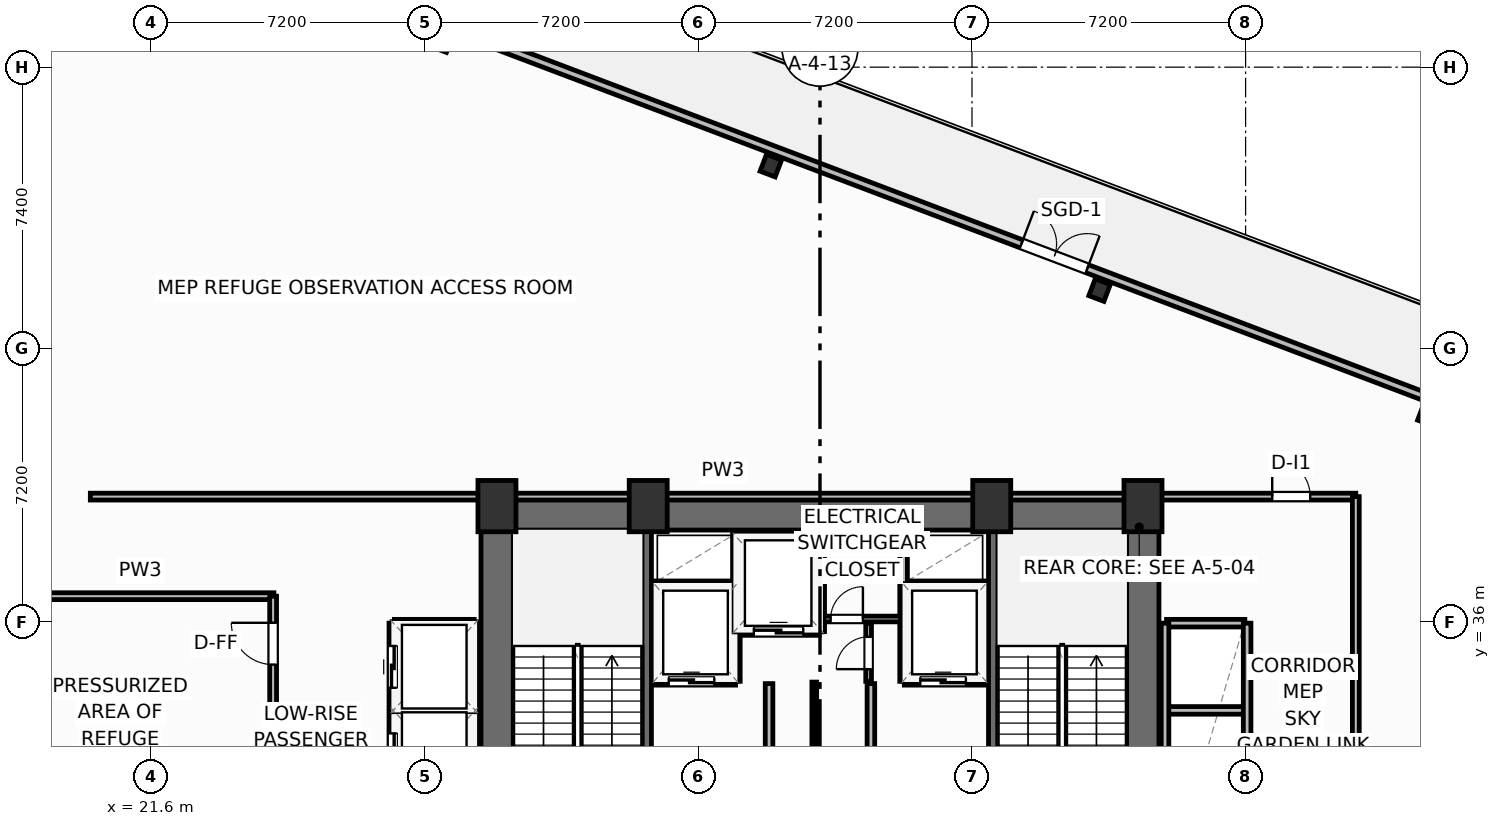
"""IFC4 building model, lengths in metres.
Left out: names, types, materials, properties, quantities, classifications, styles, units other than length and angle.
Written with IfcOpenShell. Run it as: python <this file> out.ifc"""

import sys

from ifc_helpers import new_model, si_unit, direction, frame, frame_2d, origin, origin_2d, place, context, subcontext, project, spatial, rectangle, i_section, extrude, element, fill, save


model = new_model("IFC4")
c1 = context("Model", 3, precision=1e-05, world=origin(), true_north=direction((0.0, 1.0)))
c2 = subcontext(c1, "Body", "Model", "MODEL_VIEW")
j1 = project(units=[si_unit("LENGTHUNIT", "METRE"), si_unit("PLANEANGLEUNIT", "RADIAN")], contexts=[c1])
p1 = place(None, origin())
s1 = spatial("IfcSite", under=j1, at=p1, CompositionType="ELEMENT")
p2 = place(p1, origin())
s2 = spatial("IfcBuilding", under=s1, at=p2, CompositionType="ELEMENT")
p3 = place(p2, frame((0.0, 0.0, 71.4)))
s3 = spatial("IfcBuildingStorey", under=s2, at=p3, CompositionType="ELEMENT", Elevation=71.4)
for number, where, z_axis, x_axis in (
    (1, (30.7, 39.05, 0.0), (0.0, 0.0, 1.0), (1.0, 0.0, 0.0)),
    (2, (34.68, 39.05, 0.0), (0.0, 0.0, 1.0), (1.0, 0.0, 0.0)),
    (3, (43.72, 39.05, 0.0), (0.0, 0.0, 1.0), (1.0, 0.0, 0.0)),
    (4, (47.7, 39.05, 0.0), (0.0, 0.0, 1.0), (1.0, 0.0, 0.0)),
):
    element("IfcColumn", number, at=place(p3, frame(where, z_axis=z_axis, x_axis=x_axis)), inside=s3, PredefinedType="COLUMN", context=c2, shape_type="SweptSolid", body=[
        extrude(rectangle(XDim=1.0, YDim=1.35, at=origin_2d()), origin(), (0.0, 0.0, 1.0), 4.8),
    ])
p4 = place(p3, frame((30.28, 38.845, 0.0), z_axis=(0.0, 0.0, 1.0), x_axis=(1.0, 0.0, 0.0)))
e5 = element("IfcWall", 5, at=p4, inside=s3, PredefinedType="SHEAR", context=c2, shape_type="SweptSolid", body=[
    extrude(rectangle(XDim=17.84, YDim=0.85, at=frame_2d((8.92, 0.0))), origin(), (0.0, 0.0, 1.0), 4.55),
])
for number, where, z_axis, x_axis in (
    (6, (30.705, 29.2, 0.0), (0.0, 0.0, 1.0), (0.0, 1.0, 0.0)),
    (7, (47.695, 29.2, 0.0), (0.0, 0.0, 1.0), (0.0, 1.0, 0.0)),
):
    element("IfcWall", number, at=place(p3, frame(where, z_axis=z_axis, x_axis=x_axis)), inside=s3, PredefinedType="SHEAR", context=c2, shape_type="SweptSolid", body=[
        extrude(rectangle(XDim=9.22, YDim=0.85, at=frame_2d((4.61, 0.0))), origin(), (0.0, 0.0, 1.0), 4.55),
    ])
p5 = place(p3, frame((34.64, 29.2, 0.0), z_axis=(0.0, 0.0, 1.0), x_axis=(0.0, 1.0, 0.0)))
e8 = element("IfcWall", 8, at=p5, inside=s3, PredefinedType="SHEAR", context=c2, shape_type="SweptSolid", body=[
    extrude(rectangle(XDim=9.22, YDim=0.25, at=frame_2d((4.61, 0.0))), origin(), (0.0, 0.0, 1.0), 4.55),
])
p6 = place(p5, frame((0.65, 0.0, 0.0)))
e9 = element("IfcOpeningElement", 9, at=p6, cuts=e8, PredefinedType="OPENING", context=c2, shape_type="SweptSolid", body=[
    extrude(rectangle(XDim=1.05, YDim=2.15, at=frame_2d((0.525, 1.075))), frame((0.0, 0.135, 0.0), z_axis=(0.0, -1.0, 0.0), x_axis=(1.0, 0.0, 0.0)), (0.0, 0.0, 1.0), 0.27),
])
p7 = place(p3, frame((43.76, 29.2, 0.0), z_axis=(0.0, 0.0, 1.0), x_axis=(0.0, 1.0, 0.0)))
e10 = element("IfcWall", 10, at=p7, inside=s3, PredefinedType="SHEAR", context=c2, shape_type="SweptSolid", body=[
    extrude(rectangle(XDim=9.22, YDim=0.25, at=frame_2d((4.61, 0.0))), origin(), (0.0, 0.0, 1.0), 4.55),
])
p8 = place(p7, frame((0.65, 0.0, 0.0)))
e11 = element("IfcOpeningElement", 11, at=p8, cuts=e10, PredefinedType="OPENING", context=c2, shape_type="SweptSolid", body=[
    extrude(rectangle(XDim=1.05, YDim=2.15, at=frame_2d((0.525, 1.075))), frame((0.0, 0.135, 0.0), z_axis=(0.0, -1.0, 0.0), x_axis=(1.0, 0.0, 0.0)), (0.0, 0.0, 1.0), 0.27),
])
for number, where, z_axis, x_axis in (
    (12, (55.208, 41.459, -0.32), (0.0, 0.0, 1.0), (0.935, -0.354, 0.0)),
    (13, (46.557, 44.734, -0.32), (0.0, 0.0, 1.0), (0.935, -0.354, 0.0)),
    (14, (37.906, 48.009, -0.32), (0.0, 0.0, 1.0), (0.935, -0.354, 0.0)),
    (15, (29.256, 51.284, -0.32), (0.0, 0.0, 1.0), (0.935, -0.354, 0.0)),
):
    element("IfcColumn", number, at=place(p3, frame(where, z_axis=z_axis, x_axis=x_axis)), inside=s3, PredefinedType="COLUMN", context=c2, shape_type="SweptSolid", body=[
        extrude(i_section(OverallWidth=0.424, OverallDepth=0.474, WebThickness=0.048, FlangeThickness=0.077, FilletRadius=0.025, at=origin_2d()), origin(), (0.0, 0.0, 1.0), 5.12),
    ])
p9 = place(p3, frame((18.646, 55.739, 0.0), z_axis=(0.0, 0.0, 1.0), x_axis=(0.935222250741, -0.354061211825, 0.0)))
e16 = element("IfcWall", 16, at=p9, inside=s3, PredefinedType="SOLIDWALL", context=c2, shape_type="SweptSolid", body=[
    extrude(rectangle(XDim=60.0, YDim=0.22, at=frame_2d((30.0, 0.0))), origin(), (0.0, 0.0, 1.0), 3.83),
])
p10 = place(p9, frame((27.647, 0.0, 0.0)))
e17 = element("IfcOpeningElement", 17, at=p10, cuts=e16, PredefinedType="OPENING", context=c2, shape_type="SweptSolid", body=[
    extrude(rectangle(XDim=1.85, YDim=2.3, at=frame_2d((0.925, 1.15))), frame((0.0, 0.12, 0.0), z_axis=(0.0, -1.0, 0.0), x_axis=(1.0, 0.0, 0.0)), (0.0, 0.0, 1.0), 0.24),
])
p11 = place(p9, frame((0.55, 0.0, 0.75)))
e18 = element("IfcOpeningElement", 18, at=p11, cuts=e16, PredefinedType="OPENING", context=c2, shape_type="SweptSolid", body=[
    extrude(rectangle(XDim=1.65, YDim=1.65, at=frame_2d((0.825, 0.825))), frame((0.0, 0.12, 0.0), z_axis=(0.0, -1.0, 0.0), x_axis=(1.0, 0.0, 0.0)), (0.0, 0.0, 1.0), 0.24),
])
p12 = place(p9, frame((57.8, 0.0, 0.75)))
e19 = element("IfcOpeningElement", 19, at=p12, cuts=e16, PredefinedType="OPENING", context=c2, shape_type="SweptSolid", body=[
    extrude(rectangle(XDim=1.65, YDim=1.65, at=frame_2d((0.825, 0.825))), frame((0.0, 0.12, 0.0), z_axis=(0.0, -1.0, 0.0), x_axis=(1.0, 0.0, 0.0)), (0.0, 0.0, 1.0), 0.24),
])
p13 = place(p3, frame((17.8, 36.68, 0.0), z_axis=(0.0, 0.0, 1.0), x_axis=(1.0, 0.0, 0.0)))
e20 = element("IfcWall", 20, at=p13, inside=s3, PredefinedType="PARTITIONING", context=c2, shape_type="SweptSolid", body=[
    extrude(rectangle(XDim=7.03, YDim=0.18, at=frame_2d((3.515, 0.0))), origin(), (0.0, 0.0, 1.0), 4.55),
])
p14 = place(p3, frame((24.81, 29.08, 0.0), z_axis=(0.0, 0.0, 1.0), x_axis=(0.0, 1.0, 0.0)))
e21 = element("IfcWall", 21, at=p14, inside=s3, PredefinedType="PARTITIONING", context=c2, shape_type="SweptSolid", body=[
    extrude(rectangle(XDim=7.6, YDim=0.18, at=frame_2d((3.8, 0.0))), origin(), (0.0, 0.0, 1.0), 4.55),
])
p15 = place(p14, frame((5.8, 0.0, 0.0)))
e22 = element("IfcOpeningElement", 22, at=p15, cuts=e21, PredefinedType="OPENING", context=c2, shape_type="SweptSolid", body=[
    extrude(rectangle(XDim=1.1, YDim=2.15, at=frame_2d((0.55, 1.075))), frame((0.0, 0.1, 0.0), z_axis=(0.0, -1.0, 0.0), x_axis=(1.0, 0.0, 0.0)), (0.0, 0.0, 1.0), 0.2),
])
p16 = place(p3, frame((20.0, 39.3, 0.0), z_axis=(0.0, 0.0, 1.0), x_axis=(1.0, 0.0, 0.0)))
e23 = element("IfcWall", 23, at=p16, inside=s3, PredefinedType="PARTITIONING", context=c2, shape_type="SweptSolid", body=[
    extrude(rectangle(XDim=33.3, YDim=0.18, at=frame_2d((16.65, 0.0))), origin(), (0.0, 0.0, 1.0), 3.68),
])
p17 = place(p16, frame((31.1, 0.0, 0.0)))
e24 = element("IfcOpeningElement", 24, at=p17, cuts=e23, PredefinedType="OPENING", context=c2, shape_type="SweptSolid", body=[
    extrude(rectangle(XDim=1.0, YDim=2.05, at=frame_2d((0.5, 1.025))), frame((0.0, 0.1, 0.0), z_axis=(0.0, -1.0, 0.0), x_axis=(1.0, 0.0, 0.0)), (0.0, 0.0, 1.0), 0.2),
])
p18 = place(p3, frame((53.3, 29.02, 0.0), z_axis=(0.0, 0.0, 1.0), x_axis=(0.0, 1.0, 0.0)))
e25 = element("IfcWall", 25, at=p18, inside=s3, PredefinedType="PARTITIONING", context=c2, shape_type="SweptSolid", body=[
    extrude(rectangle(XDim=10.28, YDim=0.18, at=frame_2d((5.14, 0.0))), origin(), (0.0, 0.0, 1.0), 4.55),
])
for number, where, z_axis, x_axis in (
    (26, (37.86, 29.2, 0.0), (0.0, 0.0, 1.0), (0.0, 1.0, 0.0)),
    (27, (40.54, 29.2, 0.0), (0.0, 0.0, 1.0), (0.0, 1.0, 0.0)),
):
    element("IfcWall", number, at=place(p3, frame(where, z_axis=z_axis, x_axis=x_axis)), inside=s3, PredefinedType="PARTITIONING", context=c2, shape_type="SweptSolid", body=[
        extrude(rectangle(XDim=5.18, YDim=0.2, at=frame_2d((2.59, 0.0))), origin(), (0.0, 0.0, 1.0), 4.55),
    ])
p19 = place(p3, frame((34.8, 34.44, 0.0), z_axis=(0.0, 0.0, 1.0), x_axis=(1.0, 0.0, 0.0)))
e28 = element("IfcWall", 28, at=p19, inside=s3, PredefinedType="PARTITIONING", context=c2, shape_type="SweptSolid", body=[
    extrude(rectangle(XDim=2.18, YDim=0.2, at=frame_2d((1.09, 0.0))), origin(), (0.0, 0.0, 1.0), 4.55),
])
p20 = place(p19, frame((0.42, 0.0, 0.0)))
e29 = element("IfcOpeningElement", 29, at=p20, cuts=e28, PredefinedType="OPENING", context=c2, shape_type="SweptSolid", body=[
    extrude(rectangle(XDim=1.2, YDim=2.2, at=frame_2d((0.6, 1.1))), frame((0.0, 0.11, 0.0), z_axis=(0.0, -1.0, 0.0), x_axis=(1.0, 0.0, 0.0)), (0.0, 0.0, 1.0), 0.22),
])
p21 = place(p3, frame((34.8, 36.98, 0.0), z_axis=(0.0, 0.0, 1.0), x_axis=(1.0, 0.0, 0.0)))
e30 = element("IfcWall", 30, at=p21, inside=s3, PredefinedType="PARTITIONING", context=c2, shape_type="SweptSolid", body=[
    extrude(rectangle(XDim=2.18, YDim=0.2, at=frame_2d((1.09, 0.0))), origin(), (0.0, 0.0, 1.0), 4.55),
])
p22 = place(p3, frame((37.0, 34.44, 0.0), z_axis=(0.0, 0.0, 1.0), x_axis=(0.0, 1.0, 0.0)))
e31 = element("IfcWall", 31, at=p22, inside=s3, PredefinedType="PARTITIONING", context=c2, shape_type="SweptSolid", body=[
    extrude(rectangle(XDim=3.9, YDim=0.2, at=frame_2d((1.95, 0.0))), origin(), (0.0, 0.0, 1.0), 4.55),
])
p23 = place(p3, frame((41.42, 34.44, 0.0), z_axis=(0.0, 0.0, 1.0), x_axis=(1.0, 0.0, 0.0)))
e32 = element("IfcWall", 32, at=p23, inside=s3, PredefinedType="PARTITIONING", context=c2, shape_type="SweptSolid", body=[
    extrude(rectangle(XDim=2.18, YDim=0.2, at=frame_2d((1.09, 0.0))), origin(), (0.0, 0.0, 1.0), 4.55),
])
p24 = place(p23, frame((0.42, 0.0, 0.0)))
e33 = element("IfcOpeningElement", 33, at=p24, cuts=e32, PredefinedType="OPENING", context=c2, shape_type="SweptSolid", body=[
    extrude(rectangle(XDim=1.2, YDim=2.2, at=frame_2d((0.6, 1.1))), frame((0.0, 0.11, 0.0), z_axis=(0.0, -1.0, 0.0), x_axis=(1.0, 0.0, 0.0)), (0.0, 0.0, 1.0), 0.22),
])
p25 = place(p3, frame((41.42, 36.98, 0.0), z_axis=(0.0, 0.0, 1.0), x_axis=(1.0, 0.0, 0.0)))
e34 = element("IfcWall", 34, at=p25, inside=s3, PredefinedType="PARTITIONING", context=c2, shape_type="SweptSolid", body=[
    extrude(rectangle(XDim=2.18, YDim=0.2, at=frame_2d((1.09, 0.0))), origin(), (0.0, 0.0, 1.0), 4.55),
])
p26 = place(p3, frame((41.4, 34.44, 0.0), z_axis=(0.0, 0.0, 1.0), x_axis=(0.0, 1.0, 0.0)))
e35 = element("IfcWall", 35, at=p26, inside=s3, PredefinedType="PARTITIONING", context=c2, shape_type="SweptSolid", body=[
    extrude(rectangle(XDim=3.9, YDim=0.2, at=frame_2d((1.95, 0.0))), origin(), (0.0, 0.0, 1.0), 4.55),
])
p27 = place(p3, frame((37.06, 35.75, 0.0), z_axis=(0.0, 0.0, 1.0), x_axis=(1.0, 0.0, 0.0)))
e36 = element("IfcWall", 36, at=p27, inside=s3, PredefinedType="PARTITIONING", context=c2, shape_type="SweptSolid", body=[
    extrude(rectangle(XDim=2.12, YDim=0.2, at=frame_2d((1.06, 0.0))), origin(), (0.0, 0.0, 1.0), 4.55),
])
p28 = place(p27, frame((0.4, 0.0, 0.0)))
e37 = element("IfcOpeningElement", 37, at=p28, cuts=e36, PredefinedType="OPENING", context=c2, shape_type="SweptSolid", body=[
    extrude(rectangle(XDim=1.3, YDim=2.2, at=frame_2d((0.65, 1.1))), frame((0.0, 0.11, 0.0), z_axis=(0.0, -1.0, 0.0), x_axis=(1.0, 0.0, 0.0)), (0.0, 0.0, 1.0), 0.22),
])
p29 = place(p3, frame((39.22, 35.75, 0.0), z_axis=(0.0, 0.0, 1.0), x_axis=(0.0, 1.0, 0.0)))
e38 = element("IfcWall", 38, at=p29, inside=s3, PredefinedType="PARTITIONING", context=c2, shape_type="SweptSolid", body=[
    extrude(rectangle(XDim=2.59, YDim=0.2, at=frame_2d((1.295, 0.0))), origin(), (0.0, 0.0, 1.0), 4.55),
])
p30 = place(p3, frame((39.3, 36.08, 0.0), z_axis=(0.0, 0.0, 1.0), x_axis=(1.0, 0.0, 0.0)))
e39 = element("IfcWall", 39, at=p30, inside=s3, PredefinedType="PARTITIONING", context=c2, shape_type="SweptSolid", body=[
    extrude(rectangle(XDim=2.02, YDim=0.15, at=frame_2d((1.01, 0.0))), origin(), (0.0, 0.0, 1.0), 4.55),
])
p31 = place(p30, frame((0.18, 0.0, 0.0)))
e40 = element("IfcOpeningElement", 40, at=p31, cuts=e39, PredefinedType="OPENING", context=c2, shape_type="SweptSolid", body=[
    extrude(rectangle(XDim=0.85, YDim=2.05, at=frame_2d((0.425, 1.025))), frame((0.0, 0.085, 0.0), z_axis=(0.0, -1.0, 0.0), x_axis=(1.0, 0.0, 0.0)), (0.0, 0.0, 1.0), 0.17),
])
p32 = place(p3, frame((40.48, 34.44, 0.0), z_axis=(0.0, 0.0, 1.0), x_axis=(0.0, 1.0, 0.0)))
e41 = element("IfcWall", 41, at=p32, inside=s3, PredefinedType="PARTITIONING", context=c2, shape_type="SweptSolid", body=[
    extrude(rectangle(XDim=1.52, YDim=0.15, at=frame_2d((0.76, 0.0))), origin(), (0.0, 0.0, 1.0), 4.55),
])
p33 = place(p32, frame((0.32, 0.0, 0.0)))
e42 = element("IfcOpeningElement", 42, at=p33, cuts=e41, PredefinedType="OPENING", context=c2, shape_type="SweptSolid", body=[
    extrude(rectangle(XDim=0.85, YDim=2.05, at=frame_2d((0.425, 1.025))), frame((0.0, 0.085, 0.0), z_axis=(0.0, -1.0, 0.0), x_axis=(1.0, 0.0, 0.0)), (0.0, 0.0, 1.0), 0.17),
])
p34 = place(p3, frame((39.05, 29.2, 0.0), z_axis=(0.0, 0.0, 1.0), x_axis=(0.0, 1.0, 0.0)))
e43 = element("IfcWall", 43, at=p34, inside=s3, PredefinedType="PARTITIONING", context=c2, shape_type="SweptSolid", body=[
    extrude(rectangle(XDim=5.22, YDim=0.125, at=frame_2d((2.61, 0.0))), origin(), (0.0, 0.0, 1.0), 4.55),
])
p35 = place(p34, frame((2.05, 0.0, 0.0)))
e44 = element("IfcOpeningElement", 44, at=p35, cuts=e43, PredefinedType="OPENING", context=c2, shape_type="SweptSolid", body=[
    extrude(rectangle(XDim=0.85, YDim=2.05, at=frame_2d((0.425, 1.025))), frame((0.0, 0.073, 0.0), z_axis=(0.0, -1.0, 0.0), x_axis=(1.0, 0.0, 0.0)), (0.0, 0.0, 1.0), 0.145),
])
p36 = place(p3, frame((28.02, 33.675, 0.0), z_axis=(0.0, 0.0, 1.0), x_axis=(1.0, 0.0, 0.0)))
e45 = element("IfcWall", 45, at=p36, inside=s3, PredefinedType="PARTITIONING", context=c2, shape_type="SweptSolid", body=[
    extrude(rectangle(XDim=2.06, YDim=0.2, at=frame_2d((1.03, 0.0))), origin(), (0.0, 0.0, 1.0), 4.55),
])
p37 = place(p3, frame((28.0, 35.97, 0.0), z_axis=(0.0, 0.0, 1.0), x_axis=(1.0, 0.0, 0.0)))
e46 = element("IfcWall", 46, at=p37, inside=s3, PredefinedType="PARTITIONING", context=c2, shape_type="SweptSolid", body=[
    extrude(rectangle(XDim=2.1, YDim=0.2, at=frame_2d((1.05, 0.0))), origin(), (0.0, 0.0, 1.0), 4.55),
])
p38 = place(p3, frame((30.12, 29.08, 0.0), z_axis=(0.0, 0.0, 1.0), x_axis=(0.0, 1.0, 0.0)))
e47 = element("IfcWall", 47, at=p38, inside=s3, PredefinedType="PARTITIONING", context=c2, shape_type="SweptSolid", body=[
    extrude(rectangle(XDim=6.89, YDim=0.2, at=frame_2d((3.445, 0.0))), origin(), (0.0, 0.0, 1.0), 4.55),
])
p39 = place(p3, frame((27.96, 29.08, 0.0), z_axis=(0.0, 0.0, 1.0), x_axis=(0.0, 1.0, 0.0)))
e48 = element("IfcWall", 48, at=p39, inside=s3, PredefinedType="PARTITIONING", context=c2, shape_type="SweptSolid", body=[
    extrude(rectangle(XDim=6.89, YDim=0.2, at=frame_2d((3.445, 0.0))), origin(), (0.0, 0.0, 1.0), 4.55),
])
p40 = place(p39, frame((0.59, 0.0, 0.0)))
e49 = element("IfcOpeningElement", 49, at=p40, cuts=e48, PredefinedType="OPENING", context=c2, shape_type="SweptSolid", body=[
    extrude(rectangle(XDim=1.1, YDim=2.15, at=frame_2d((0.55, 1.075))), frame((0.0, 0.11, 0.0), z_axis=(0.0, -1.0, 0.0), x_axis=(1.0, 0.0, 0.0)), (0.0, 0.0, 1.0), 0.22),
])
p41 = place(p39, frame((2.89, 0.0, 0.0)))
e50 = element("IfcOpeningElement", 50, at=p41, cuts=e48, PredefinedType="OPENING", context=c2, shape_type="SweptSolid", body=[
    extrude(rectangle(XDim=1.1, YDim=2.15, at=frame_2d((0.55, 1.075))), frame((0.0, 0.11, 0.0), z_axis=(0.0, -1.0, 0.0), x_axis=(1.0, 0.0, 0.0)), (0.0, 0.0, 1.0), 0.22),
])
p42 = place(p39, frame((5.19, 0.0, 0.0)))
e51 = element("IfcOpeningElement", 51, at=p42, cuts=e48, PredefinedType="OPENING", context=c2, shape_type="SweptSolid", body=[
    extrude(rectangle(XDim=1.1, YDim=2.15, at=frame_2d((0.55, 1.075))), frame((0.0, 0.11, 0.0), z_axis=(0.0, -1.0, 0.0), x_axis=(1.0, 0.0, 0.0)), (0.0, 0.0, 1.0), 0.22),
])
for number, where, z_axis, x_axis in (
    (52, (48.32, 33.675, 0.0), (0.0, 0.0, 1.0), (1.0, 0.0, 0.0)),
    (53, (48.32, 35.97, 0.0), (0.0, 0.0, 1.0), (1.0, 0.0, 0.0)),
):
    element("IfcWall", number, at=place(p3, frame(where, z_axis=z_axis, x_axis=x_axis)), inside=s3, PredefinedType="PARTITIONING", context=c2, shape_type="SweptSolid", body=[
        extrude(rectangle(XDim=2.06, YDim=0.2, at=frame_2d((1.03, 0.0))), origin(), (0.0, 0.0, 1.0), 4.55),
    ])
for number, where, z_axis, x_axis in (
    (54, (48.28, 29.08, 0.0), (0.0, 0.0, 1.0), (0.0, 1.0, 0.0)),
    (55, (50.44, 29.08, 0.0), (0.0, 0.0, 1.0), (0.0, 1.0, 0.0)),
):
    element("IfcWall", number, at=place(p3, frame(where, z_axis=z_axis, x_axis=x_axis)), inside=s3, PredefinedType="PARTITIONING", context=c2, shape_type="SweptSolid", body=[
        extrude(rectangle(XDim=6.89, YDim=0.2, at=frame_2d((3.445, 0.0))), origin(), (0.0, 0.0, 1.0), 4.55),
    ])
p43 = place(p10, origin())
e56 = element("IfcDoor", 56, at=p43, inside=s3, OperationType="DOUBLE_DOOR_SINGLE_SWING", PredefinedType="DOOR", context=c2, shape_type="SweptSolid", body=[
    extrude(rectangle(XDim=1.85, YDim=2.3, at=frame_2d((0.925, 1.15))), frame((0.0, 0.025, 0.0), z_axis=(0.0, -1.0, 0.0), x_axis=(1.0, 0.0, 0.0)), (0.0, 0.0, 1.0), 0.05),
])
fill(e17, e56)
p44 = place(p15, origin())
e57 = element("IfcDoor", 57, at=p44, inside=s3, OperationType="SINGLE_SWING_RIGHT", PredefinedType="DOOR", context=c2, shape_type="SweptSolid", body=[
    extrude(rectangle(XDim=1.1, YDim=2.15, at=frame_2d((0.55, 1.075))), frame((0.0, 0.025, 0.0), z_axis=(0.0, -1.0, 0.0), x_axis=(1.0, 0.0, 0.0)), (0.0, 0.0, 1.0), 0.05),
])
fill(e22, e57)
p45 = place(p17, origin())
e58 = element("IfcDoor", 58, at=p45, inside=s3, OperationType="SINGLE_SWING_LEFT", PredefinedType="DOOR", context=c2, shape_type="SweptSolid", body=[
    extrude(rectangle(XDim=1.0, YDim=2.05, at=frame_2d((0.5, 1.025))), frame((0.0, 0.025, 0.0), z_axis=(0.0, -1.0, 0.0), x_axis=(1.0, 0.0, 0.0)), (0.0, 0.0, 1.0), 0.05),
])
fill(e24, e58)
p46 = place(p20, origin())
e59 = element("IfcDoor", 59, at=p46, inside=s3, OperationType="SLIDING_TO_LEFT", PredefinedType="DOOR", context=c2, shape_type="SweptSolid", body=[
    extrude(rectangle(XDim=1.2, YDim=2.2, at=frame_2d((0.6, 1.1))), frame((0.0, 0.025, 0.0), z_axis=(0.0, -1.0, 0.0), x_axis=(1.0, 0.0, 0.0)), (0.0, 0.0, 1.0), 0.05),
])
fill(e29, e59)
p47 = place(p24, origin())
e60 = element("IfcDoor", 60, at=p47, inside=s3, OperationType="SLIDING_TO_LEFT", PredefinedType="DOOR", context=c2, shape_type="SweptSolid", body=[
    extrude(rectangle(XDim=1.2, YDim=2.2, at=frame_2d((0.6, 1.1))), frame((0.0, 0.025, 0.0), z_axis=(0.0, -1.0, 0.0), x_axis=(1.0, 0.0, 0.0)), (0.0, 0.0, 1.0), 0.05),
])
fill(e33, e60)
p48 = place(p28, origin())
e61 = element("IfcDoor", 61, at=p48, inside=s3, OperationType="SLIDING_TO_LEFT", PredefinedType="DOOR", context=c2, shape_type="SweptSolid", body=[
    extrude(rectangle(XDim=1.3, YDim=2.2, at=frame_2d((0.65, 1.1))), frame((0.0, 0.025, 0.0), z_axis=(0.0, -1.0, 0.0), x_axis=(1.0, 0.0, 0.0)), (0.0, 0.0, 1.0), 0.05),
])
fill(e37, e61)
p49 = place(p31, origin())
e62 = element("IfcDoor", 62, at=p49, inside=s3, OperationType="SINGLE_SWING_RIGHT", PredefinedType="DOOR", context=c2, shape_type="SweptSolid", body=[
    extrude(rectangle(XDim=0.85, YDim=2.05, at=frame_2d((0.425, 1.025))), frame((0.0, 0.025, 0.0), z_axis=(0.0, -1.0, 0.0), x_axis=(1.0, 0.0, 0.0)), (0.0, 0.0, 1.0), 0.05),
])
fill(e40, e62)
p50 = place(p33, origin())
e63 = element("IfcDoor", 63, at=p50, inside=s3, OperationType="SINGLE_SWING_LEFT", PredefinedType="DOOR", context=c2, shape_type="SweptSolid", body=[
    extrude(rectangle(XDim=0.85, YDim=2.05, at=frame_2d((0.425, 1.025))), frame((0.0, 0.025, 0.0), z_axis=(0.0, -1.0, 0.0), x_axis=(1.0, 0.0, 0.0)), (0.0, 0.0, 1.0), 0.05),
])
fill(e42, e63)
p51 = place(p41, origin())
e64 = element("IfcDoor", 64, at=p51, inside=s3, OperationType="SLIDING_TO_LEFT", PredefinedType="DOOR", context=c2, shape_type="SweptSolid", body=[
    extrude(rectangle(XDim=1.1, YDim=2.15, at=frame_2d((0.55, 1.075))), frame((0.0, 0.025, 0.0), z_axis=(0.0, -1.0, 0.0), x_axis=(1.0, 0.0, 0.0)), (0.0, 0.0, 1.0), 0.05),
])
fill(e50, e64)
p52 = place(p42, origin())
e65 = element("IfcDoor", 65, at=p52, inside=s3, OperationType="SLIDING_TO_LEFT", PredefinedType="DOOR", context=c2, shape_type="SweptSolid", body=[
    extrude(rectangle(XDim=1.1, YDim=2.15, at=frame_2d((0.55, 1.075))), frame((0.0, 0.025, 0.0), z_axis=(0.0, -1.0, 0.0), x_axis=(1.0, 0.0, 0.0)), (0.0, 0.0, 1.0), 0.05),
])
fill(e51, e65)
save(model, sys.argv[1])
